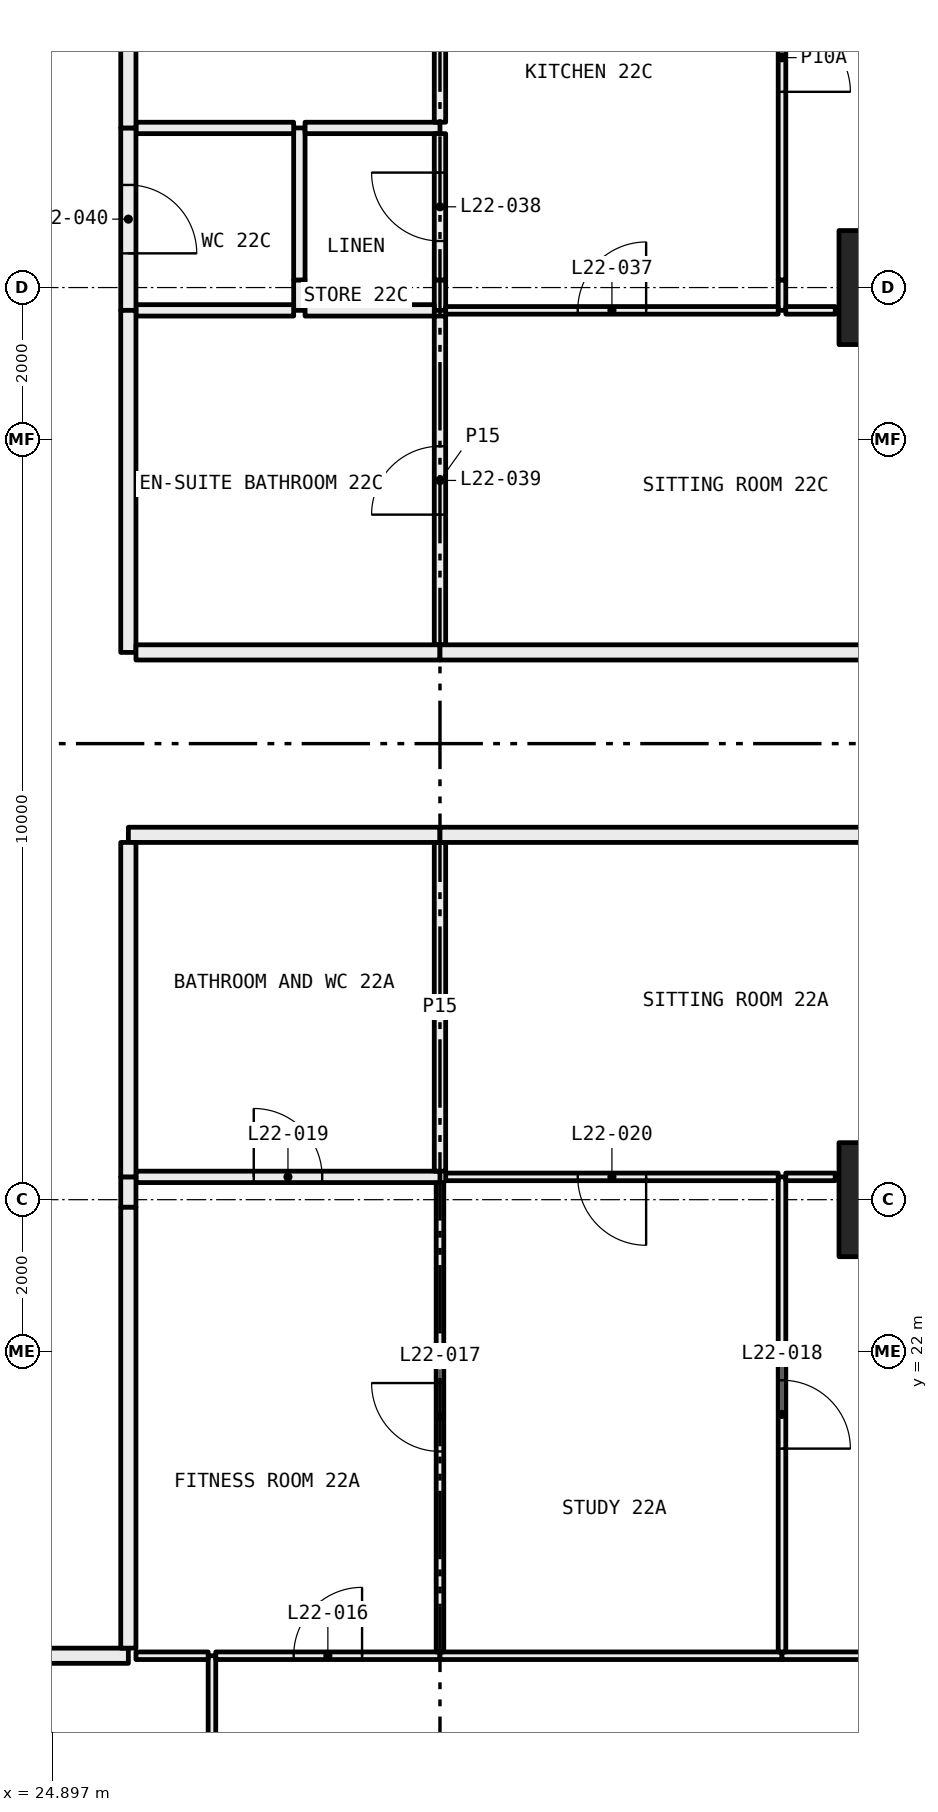
"""IFC4 building model, lengths in metres.
Left out: names, types, materials, properties, quantities, classifications, styles, units other than length and angle.
Written with IfcOpenShell. Run it as: python <this file> out.ifc"""

import sys

from ifc_helpers import new_model, si_unit, direction, frame, frame_2d, origin, origin_2d, place, context, subcontext, project, spatial, rectangle, hollow_rectangle, extrude, element, fill, save


model = new_model("IFC4")
c1 = context("Model", 3, precision=1e-05, world=origin(), true_north=direction((0.0, 1.0)))
c2 = subcontext(c1, "Body", "Model", "MODEL_VIEW")
j1 = project(units=[si_unit("LENGTHUNIT", "METRE"), si_unit("PLANEANGLEUNIT", "RADIAN")], contexts=[c1])
p1 = place(None, origin())
s1 = spatial("IfcSite", under=j1, at=p1, CompositionType="ELEMENT")
p2 = place(p1, origin())
s2 = spatial("IfcBuilding", under=s1, at=p2, CompositionType="ELEMENT")
p3 = place(p2, frame((0.0, 0.0, 88.65)))
s3 = spatial("IfcBuildingStorey", under=s2, at=p3, CompositionType="ELEMENT", Elevation=88.65)
for number, where, z_axis, x_axis in (
    (1, (36.0, 24.0, 0.0), (0.0, 0.0, 1.0), (1.0, 0.0, 0.0)),
    (2, (36.0, 36.0, 0.0), (0.0, 0.0, 1.0), (1.0, 0.0, 0.0)),
):
    element("IfcColumn", number, at=place(p3, frame(where, z_axis=z_axis, x_axis=x_axis)), inside=s3, PredefinedType="COLUMN", context=c2, shape_type="SweptSolid", body=[
        extrude(hollow_rectangle(XDim=1.5, YDim=1.5, WallThickness=0.065, at=origin_2d()), origin(), (0.0, 0.0, 1.0), 3.05),
    ])
p4 = place(p3, frame((27.0, 12.05, 0.0), z_axis=(0.0, 0.0, 1.0), x_axis=(0.0, 1.0, 0.0)))
e3 = element("IfcWall", 3, at=p4, inside=s3, PredefinedType="PARTITIONING", context=c2, shape_type="SweptSolid", body=[
    extrude(rectangle(XDim=5.95, YDim=0.1, at=frame_2d((2.975, 0.0))), origin(), (0.0, 0.0, 1.0), 2.45),
])
p5 = place(p3, frame((26.95, 18.0, 0.0), z_axis=(0.0, 0.0, 1.0), x_axis=(-1.0, 0.0, 0.0)))
e4 = element("IfcWall", 4, at=p5, inside=s3, PredefinedType="PARTITIONING", context=c2, shape_type="SweptSolid", body=[
    extrude(rectangle(XDim=0.95, YDim=0.1, at=frame_2d((0.475, 0.0))), origin(), (0.0, 0.0, 1.0), 3.05),
])
p6 = place(p3, frame((25.9, 18.0, 0.0), z_axis=(0.0, 0.0, 1.0), x_axis=(-1.0, 0.0, 0.0)))
e5 = element("IfcWall", 5, at=p6, inside=s3, PredefinedType="PARTITIONING", context=c2, shape_type="SweptSolid", body=[
    extrude(rectangle(XDim=6.4, YDim=0.2, at=frame_2d((3.2, 0.0))), origin(), (0.0, 0.0, 1.0), 3.05),
])
p7 = place(p3, frame((30.0, 18.0, 0.0), z_axis=(0.0, 0.0, 1.0), x_axis=(-1.0, 0.0, 0.0)))
e6 = element("IfcWall", 6, at=p7, inside=s3, PredefinedType="PARTITIONING", context=c2, shape_type="SweptSolid", body=[
    extrude(rectangle(XDim=2.95, YDim=0.1, at=frame_2d((1.475, 0.0))), origin(), (0.0, 0.0, 1.0), 3.05),
])
p8 = place(p7, frame((1.025, 0.0, 0.0)))
e7 = element("IfcOpeningElement", 7, at=p8, cuts=e6, PredefinedType="OPENING", context=c2, shape_type="SweptSolid", body=[
    extrude(rectangle(XDim=0.9, YDim=2.1, at=frame_2d((0.45, 1.05))), frame((0.0, 0.06, 0.0), z_axis=(0.0, -1.0, 0.0), x_axis=(1.0, 0.0, 0.0)), (0.0, 0.0, 1.0), 0.12),
])
p9 = place(p3, frame((34.5, 18.0, 0.0), z_axis=(0.0, 0.0, 1.0), x_axis=(-1.0, 0.0, 0.0)))
e8 = element("IfcWall", 8, at=p9, inside=s3, PredefinedType="PARTITIONING", context=c2, shape_type="SweptSolid", body=[
    extrude(rectangle(XDim=4.5, YDim=0.1, at=frame_2d((2.25, 0.0))), origin(), (0.0, 0.0, 1.0), 3.05),
])
p10 = place(p3, frame((35.9, 18.0, 0.0), z_axis=(0.0, 0.0, 1.0), x_axis=(-1.0, 0.0, 0.0)))
e9 = element("IfcWall", 9, at=p10, inside=s3, PredefinedType="PARTITIONING", context=c2, shape_type="SweptSolid", body=[
    extrude(rectangle(XDim=1.4, YDim=0.1, at=frame_2d((0.7, 0.0))), origin(), (0.0, 0.0, 1.0), 3.05),
])
p11 = place(p3, frame((30.0, 18.05, 0.0), z_axis=(0.0, 0.0, 1.0), x_axis=(0.0, 1.0, 0.0)))
e10 = element("IfcWall", 10, at=p11, inside=s3, PredefinedType="PARTITIONING", context=c2, shape_type="SweptSolid", body=[
    extrude(rectangle(XDim=6.175, YDim=0.1, at=frame_2d((3.087, 0.0))), origin(), (0.0, 0.0, 1.0), 2.45),
])
p12 = place(p11, frame((2.637, 0.0, 0.0)))
e11 = element("IfcOpeningElement", 11, at=p12, cuts=e10, PredefinedType="OPENING", context=c2, shape_type="SweptSolid", body=[
    extrude(rectangle(XDim=0.9, YDim=2.1, at=frame_2d((0.45, 1.05))), frame((0.0, 0.06, 0.0), z_axis=(0.0, -1.0, 0.0), x_axis=(1.0, 0.0, 0.0)), (0.0, 0.0, 1.0), 0.12),
])
p13 = place(p3, frame((30.0, 24.3, 0.0), z_axis=(0.0, 0.0, 1.0), x_axis=(-1.0, 0.0, 0.0)))
e12 = element("IfcWall", 12, at=p13, inside=s3, PredefinedType="PARTITIONING", context=c2, shape_type="SweptSolid", body=[
    extrude(rectangle(XDim=4.0, YDim=0.15, at=frame_2d((2.0, 0.0))), origin(), (0.0, 0.0, 1.0), 3.05),
])
p14 = place(p13, frame((1.55, 0.0, 0.0)))
e13 = element("IfcOpeningElement", 13, at=p14, cuts=e12, PredefinedType="OPENING", context=c2, shape_type="SweptSolid", body=[
    extrude(rectangle(XDim=0.9, YDim=2.1, at=frame_2d((0.45, 1.05))), frame((0.0, 0.085, 0.0), z_axis=(0.0, -1.0, 0.0), x_axis=(1.0, 0.0, 0.0)), (0.0, 0.0, 1.0), 0.17),
])
p15 = place(p3, frame((25.9, 24.3, 0.0), z_axis=(0.0, 0.0, 1.0), x_axis=(0.0, -1.0, 0.0)))
e14 = element("IfcWall", 14, at=p15, inside=s3, PredefinedType="PARTITIONING", context=c2, shape_type="SweptSolid", body=[
    extrude(rectangle(XDim=0.4, YDim=0.2, at=frame_2d((0.2, 0.0))), origin(), (0.0, 0.0, 1.0), 2.45),
])
p16 = place(p3, frame((25.9, 23.9, 0.0), z_axis=(0.0, 0.0, 1.0), x_axis=(0.0, -1.0, 0.0)))
e15 = element("IfcWall", 15, at=p16, inside=s3, PredefinedType="PARTITIONING", context=c2, shape_type="SweptSolid", body=[
    extrude(rectangle(XDim=5.8, YDim=0.2, at=frame_2d((2.9, 0.0))), origin(), (0.0, 0.0, 1.0), 3.05),
])
p17 = place(p3, frame((34.5, 18.05, 0.0), z_axis=(0.0, 0.0, 1.0), x_axis=(0.0, 1.0, 0.0)))
e16 = element("IfcWall", 16, at=p17, inside=s3, PredefinedType="PARTITIONING", context=c2, shape_type="SweptSolid", body=[
    extrude(rectangle(XDim=6.25, YDim=0.1, at=frame_2d((3.125, 0.0))), origin(), (0.0, 0.0, 1.0), 2.45),
])
p18 = place(p17, frame((2.675, 0.0, 0.0)))
e17 = element("IfcOpeningElement", 17, at=p18, cuts=e16, PredefinedType="OPENING", context=c2, shape_type="SweptSolid", body=[
    extrude(rectangle(XDim=0.9, YDim=2.1, at=frame_2d((0.45, 1.05))), frame((0.0, 0.06, 0.0), z_axis=(0.0, -1.0, 0.0), x_axis=(1.0, 0.0, 0.0)), (0.0, 0.0, 1.0), 0.12),
])
p19 = place(p3, frame((34.45, 24.3, 0.0), z_axis=(0.0, 0.0, 1.0), x_axis=(-1.0, 0.0, 0.0)))
e18 = element("IfcWall", 18, at=p19, inside=s3, PredefinedType="PARTITIONING", context=c2, shape_type="SweptSolid", body=[
    extrude(rectangle(XDim=4.375, YDim=0.1, at=frame_2d((2.188, 0.0))), origin(), (0.0, 0.0, 1.0), 3.05),
])
p20 = place(p19, frame((1.738, 0.0, 0.0)))
e19 = element("IfcOpeningElement", 19, at=p20, cuts=e18, PredefinedType="OPENING", context=c2, shape_type="SweptSolid", body=[
    extrude(rectangle(XDim=0.9, YDim=2.1, at=frame_2d((0.45, 1.05))), frame((0.0, 0.06, 0.0), z_axis=(0.0, -1.0, 0.0), x_axis=(1.0, 0.0, 0.0)), (0.0, 0.0, 1.0), 0.12),
])
p21 = place(p3, frame((35.2, 24.3, 0.0), z_axis=(0.0, 0.0, 1.0), x_axis=(-1.0, 0.0, 0.0)))
e20 = element("IfcWall", 20, at=p21, inside=s3, PredefinedType="PARTITIONING", context=c2, shape_type="SweptSolid", body=[
    extrude(rectangle(XDim=0.65, YDim=0.1, at=frame_2d((0.325, 0.0))), origin(), (0.0, 0.0, 1.0), 3.05),
])
p22 = place(p3, frame((30.0, 24.375, 0.0), z_axis=(0.0, 0.0, 1.0), x_axis=(0.0, 1.0, 0.0)))
e21 = element("IfcWall", 21, at=p22, inside=s3, PredefinedType="PARTITIONING", context=c2, shape_type="SweptSolid", body=[
    extrude(rectangle(XDim=4.325, YDim=0.15, at=frame_2d((2.163, 0.0))), origin(), (0.0, 0.0, 1.0), 3.05),
])
p23 = place(p3, frame((30.0, 28.8, 0.0), z_axis=(0.0, 0.0, 1.0), x_axis=(-1.0, 0.0, 0.0)))
e22 = element("IfcWall", 22, at=p23, inside=s3, PredefinedType="PARTITIONING", context=c2, shape_type="SweptSolid", body=[
    extrude(rectangle(XDim=4.1, YDim=0.2, at=frame_2d((2.05, 0.0))), origin(), (0.0, 0.0, 1.0), 3.05),
])
p24 = place(p3, frame((25.9, 28.7, 0.0), z_axis=(0.0, 0.0, 1.0), x_axis=(0.0, -1.0, 0.0)))
e23 = element("IfcWall", 23, at=p24, inside=s3, PredefinedType="PARTITIONING", context=c2, shape_type="SweptSolid", body=[
    extrude(rectangle(XDim=4.4, YDim=0.2, at=frame_2d((2.2, 0.0))), origin(), (0.0, 0.0, 1.0), 3.05),
])
p25 = place(p3, frame((35.9, 28.8, 0.0), z_axis=(0.0, 0.0, 1.0), x_axis=(-1.0, 0.0, 0.0)))
e24 = element("IfcWall", 24, at=p25, inside=s3, PredefinedType="PARTITIONING", context=c2, shape_type="SweptSolid", body=[
    extrude(rectangle(XDim=5.9, YDim=0.2, at=frame_2d((2.95, 0.0))), origin(), (0.0, 0.0, 1.0), 3.05),
])
p26 = place(p3, frame((28.15, 35.7, 0.0), z_axis=(0.0, 0.0, 1.0), x_axis=(0.0, 1.0, 0.0)))
e25 = element("IfcWall", 25, at=p26, inside=s3, PredefinedType="PARTITIONING", context=c2, shape_type="SweptSolid", body=[
    extrude(rectangle(XDim=0.4, YDim=0.15, at=frame_2d((0.2, 0.0))), origin(), (0.0, 0.0, 1.0), 2.45),
])
p27 = place(p3, frame((28.15, 36.1, 0.0), z_axis=(0.0, 0.0, 1.0), x_axis=(0.0, 1.0, 0.0)))
e26 = element("IfcWall", 26, at=p27, inside=s3, PredefinedType="PARTITIONING", context=c2, shape_type="SweptSolid", body=[
    extrude(rectangle(XDim=2.0, YDim=0.15, at=frame_2d((1.0, 0.0))), origin(), (0.0, 0.0, 1.0), 3.05),
])
for number, where, z_axis, x_axis in (
    (27, (28.075, 38.1, 0.0), (0.0, 0.0, 1.0), (-1.0, 0.0, 0.0)),
    (28, (26.0, 35.7, 0.0), (0.0, 0.0, 1.0), (1.0, 0.0, 0.0)),
):
    element("IfcWall", number, at=place(p3, frame(where, z_axis=z_axis, x_axis=x_axis)), inside=s3, PredefinedType="PARTITIONING", context=c2, shape_type="SweptSolid", body=[
        extrude(rectangle(XDim=2.075, YDim=0.15, at=frame_2d((1.038, 0.0))), origin(), (0.0, 0.0, 1.0), 3.05),
    ])
p28 = place(p3, frame((25.9, 38.1, 0.0), z_axis=(0.0, 0.0, 1.0), x_axis=(0.0, -1.0, 0.0)))
e29 = element("IfcWall", 29, at=p28, inside=s3, PredefinedType="PARTITIONING", context=c2, shape_type="SweptSolid", body=[
    extrude(rectangle(XDim=2.4, YDim=0.2, at=frame_2d((1.2, 0.0))), origin(), (0.0, 0.0, 1.0), 2.45),
])
p29 = place(p28, frame((0.75, 0.0, 0.0)))
e30 = element("IfcOpeningElement", 30, at=p29, cuts=e29, PredefinedType="OPENING", context=c2, shape_type="SweptSolid", body=[
    extrude(rectangle(XDim=0.9, YDim=2.1, at=frame_2d((0.45, 1.05))), frame((0.0, 0.11, 0.0), z_axis=(0.0, -1.0, 0.0), x_axis=(1.0, 0.0, 0.0)), (0.0, 0.0, 1.0), 0.22),
])
p30 = place(p3, frame((30.0, 38.1, 0.0), z_axis=(0.0, 0.0, 1.0), x_axis=(-1.0, 0.0, 0.0)))
e31 = element("IfcWall", 31, at=p30, inside=s3, PredefinedType="PARTITIONING", context=c2, shape_type="SweptSolid", body=[
    extrude(rectangle(XDim=1.775, YDim=0.15, at=frame_2d((0.887, 0.0))), origin(), (0.0, 0.0, 1.0), 3.05),
])
p31 = place(p3, frame((30.0, 35.7, 0.0), z_axis=(0.0, 0.0, 1.0), x_axis=(0.0, 1.0, 0.0)))
e32 = element("IfcWall", 32, at=p31, inside=s3, PredefinedType="PARTITIONING", context=c2, shape_type="SweptSolid", body=[
    extrude(rectangle(XDim=0.4, YDim=0.15, at=frame_2d((0.2, 0.0))), origin(), (0.0, 0.0, 1.0), 2.45),
])
p32 = place(p3, frame((30.0, 36.1, 0.0), z_axis=(0.0, 0.0, 1.0), x_axis=(0.0, 1.0, 0.0)))
e33 = element("IfcWall", 33, at=p32, inside=s3, PredefinedType="PARTITIONING", context=c2, shape_type="SweptSolid", body=[
    extrude(rectangle(XDim=1.925, YDim=0.15, at=frame_2d((0.962, 0.0))), origin(), (0.0, 0.0, 1.0), 3.05),
])
p33 = place(p32, frame((0.512, 0.0, 0.0)))
e34 = element("IfcOpeningElement", 34, at=p33, cuts=e33, PredefinedType="OPENING", context=c2, shape_type="SweptSolid", body=[
    extrude(rectangle(XDim=0.9, YDim=2.1, at=frame_2d((0.45, 1.05))), frame((0.0, 0.085, 0.0), z_axis=(0.0, -1.0, 0.0), x_axis=(1.0, 0.0, 0.0)), (0.0, 0.0, 1.0), 0.17),
])
p34 = place(p3, frame((28.225, 35.7, 0.0), z_axis=(0.0, 0.0, 1.0), x_axis=(1.0, 0.0, 0.0)))
e35 = element("IfcWall", 35, at=p34, inside=s3, PredefinedType="PARTITIONING", context=c2, shape_type="SweptSolid", body=[
    extrude(rectangle(XDim=1.7, YDim=0.15, at=frame_2d((0.85, 0.0))), origin(), (0.0, 0.0, 1.0), 3.05),
])
p35 = place(p3, frame((30.0, 38.175, 0.0), z_axis=(0.0, 0.0, 1.0), x_axis=(0.0, 1.0, 0.0)))
e36 = element("IfcWall", 36, at=p35, inside=s3, PredefinedType="PARTITIONING", context=c2, shape_type="SweptSolid", body=[
    extrude(rectangle(XDim=3.75, YDim=0.15, at=frame_2d((1.875, 0.0))), origin(), (0.0, 0.0, 1.0), 3.05),
])
p36 = place(p3, frame((25.9, 41.9, 0.0), z_axis=(0.0, 0.0, 1.0), x_axis=(0.0, -1.0, 0.0)))
e37 = element("IfcWall", 37, at=p36, inside=s3, PredefinedType="PARTITIONING", context=c2, shape_type="SweptSolid", body=[
    extrude(rectangle(XDim=3.8, YDim=0.2, at=frame_2d((1.9, 0.0))), origin(), (0.0, 0.0, 1.0), 3.05),
])
p37 = place(p3, frame((34.5, 35.7, 0.0), z_axis=(0.0, 0.0, 1.0), x_axis=(0.0, 1.0, 0.0)))
e38 = element("IfcWall", 38, at=p37, inside=s3, PredefinedType="PARTITIONING", context=c2, shape_type="SweptSolid", body=[
    extrude(rectangle(XDim=0.4, YDim=0.1, at=frame_2d((0.2, 0.0))), origin(), (0.0, 0.0, 1.0), 2.45),
])
p38 = place(p3, frame((34.5, 36.1, 0.0), z_axis=(0.0, 0.0, 1.0), x_axis=(0.0, 1.0, 0.0)))
e39 = element("IfcWall", 39, at=p38, inside=s3, PredefinedType="PARTITIONING", context=c2, shape_type="SweptSolid", body=[
    extrude(rectangle(XDim=5.85, YDim=0.1, at=frame_2d((2.925, 0.0))), origin(), (0.0, 0.0, 1.0), 3.05),
])
p39 = place(p38, frame((2.475, 0.0, 0.0)))
e40 = element("IfcOpeningElement", 40, at=p39, cuts=e39, PredefinedType="OPENING", context=c2, shape_type="SweptSolid", body=[
    extrude(rectangle(XDim=0.9, YDim=2.1, at=frame_2d((0.45, 1.05))), frame((0.0, 0.06, 0.0), z_axis=(0.0, -1.0, 0.0), x_axis=(1.0, 0.0, 0.0)), (0.0, 0.0, 1.0), 0.12),
])
p40 = place(p3, frame((30.075, 35.7, 0.0), z_axis=(0.0, 0.0, 1.0), x_axis=(1.0, 0.0, 0.0)))
e41 = element("IfcWall", 41, at=p40, inside=s3, PredefinedType="PARTITIONING", context=c2, shape_type="SweptSolid", body=[
    extrude(rectangle(XDim=4.375, YDim=0.1, at=frame_2d((2.188, 0.0))), origin(), (0.0, 0.0, 1.0), 3.05),
])
p41 = place(p40, frame((1.738, 0.0, 0.0)))
e42 = element("IfcOpeningElement", 42, at=p41, cuts=e41, PredefinedType="OPENING", context=c2, shape_type="SweptSolid", body=[
    extrude(rectangle(XDim=0.9, YDim=2.1, at=frame_2d((0.45, 1.05))), frame((0.0, 0.06, 0.0), z_axis=(0.0, -1.0, 0.0), x_axis=(1.0, 0.0, 0.0)), (0.0, 0.0, 1.0), 0.12),
])
p42 = place(p3, frame((34.55, 35.7, 0.0), z_axis=(0.0, 0.0, 1.0), x_axis=(1.0, 0.0, 0.0)))
e43 = element("IfcWall", 43, at=p42, inside=s3, PredefinedType="PARTITIONING", context=c2, shape_type="SweptSolid", body=[
    extrude(rectangle(XDim=0.65, YDim=0.1, at=frame_2d((0.325, 0.0))), origin(), (0.0, 0.0, 1.0), 3.05),
])
p43 = place(p3, frame((30.0, 31.3, 0.0), z_axis=(0.0, 0.0, 1.0), x_axis=(0.0, 1.0, 0.0)))
e44 = element("IfcWall", 44, at=p43, inside=s3, PredefinedType="PARTITIONING", context=c2, shape_type="SweptSolid", body=[
    extrude(rectangle(XDim=4.325, YDim=0.15, at=frame_2d((2.163, 0.0))), origin(), (0.0, 0.0, 1.0), 3.05),
])
p44 = place(p43, frame((1.712, 0.0, 0.0)))
e45 = element("IfcOpeningElement", 45, at=p44, cuts=e44, PredefinedType="OPENING", context=c2, shape_type="SweptSolid", body=[
    extrude(rectangle(XDim=0.9, YDim=2.1, at=frame_2d((0.45, 1.05))), frame((0.0, 0.085, 0.0), z_axis=(0.0, -1.0, 0.0), x_axis=(1.0, 0.0, 0.0)), (0.0, 0.0, 1.0), 0.17),
])
p45 = place(p3, frame((25.9, 35.7, 0.0), z_axis=(0.0, 0.0, 1.0), x_axis=(0.0, -1.0, 0.0)))
e46 = element("IfcWall", 46, at=p45, inside=s3, PredefinedType="PARTITIONING", context=c2, shape_type="SweptSolid", body=[
    extrude(rectangle(XDim=4.5, YDim=0.2, at=frame_2d((2.25, 0.0))), origin(), (0.0, 0.0, 1.0), 3.05),
])
p46 = place(p3, frame((26.0, 31.2, 0.0), z_axis=(0.0, 0.0, 1.0), x_axis=(1.0, 0.0, 0.0)))
e47 = element("IfcWall", 47, at=p46, inside=s3, PredefinedType="PARTITIONING", context=c2, shape_type="SweptSolid", body=[
    extrude(rectangle(XDim=4.0, YDim=0.2, at=frame_2d((2.0, 0.0))), origin(), (0.0, 0.0, 1.0), 3.05),
])
p47 = place(p3, frame((30.0, 31.2, 0.0), z_axis=(0.0, 0.0, 1.0), x_axis=(1.0, 0.0, 0.0)))
e48 = element("IfcWall", 48, at=p47, inside=s3, PredefinedType="PARTITIONING", context=c2, shape_type="SweptSolid", body=[
    extrude(rectangle(XDim=6.1, YDim=0.2, at=frame_2d((3.05, 0.0))), origin(), (0.0, 0.0, 1.0), 2.45),
])
p48 = place(p8, frame((0.9, 0.0, 0.0), x_axis=(-1.0, 0.0, 0.0)))
e49 = element("IfcDoor", 49, at=p48, inside=s3, OperationType="SINGLE_SWING_LEFT", PredefinedType="DOOR", context=c2, shape_type="SweptSolid", body=[
    extrude(rectangle(XDim=0.9, YDim=2.1, at=frame_2d((0.45, 1.05))), frame((0.0, 0.025, 0.0), z_axis=(0.0, -1.0, 0.0), x_axis=(1.0, 0.0, 0.0)), (0.0, 0.0, 1.0), 0.05),
])
fill(e7, e49)
p49 = place(p12, origin())
e50 = element("IfcDoor", 50, at=p49, inside=s3, OperationType="SINGLE_SWING_LEFT", PredefinedType="DOOR", context=c2, shape_type="SweptSolid", body=[
    extrude(rectangle(XDim=0.9, YDim=2.1, at=frame_2d((0.45, 1.05))), frame((0.0, 0.025, 0.0), z_axis=(0.0, -1.0, 0.0), x_axis=(1.0, 0.0, 0.0)), (0.0, 0.0, 1.0), 0.05),
])
fill(e11, e50)
p50 = place(p18, frame((0.9, 0.0, 0.0), x_axis=(-1.0, 0.0, 0.0)))
e51 = element("IfcDoor", 51, at=p50, inside=s3, OperationType="SINGLE_SWING_LEFT", PredefinedType="DOOR", context=c2, shape_type="SweptSolid", body=[
    extrude(rectangle(XDim=0.9, YDim=2.1, at=frame_2d((0.45, 1.05))), frame((0.0, 0.025, 0.0), z_axis=(0.0, -1.0, 0.0), x_axis=(1.0, 0.0, 0.0)), (0.0, 0.0, 1.0), 0.05),
])
fill(e17, e51)
p51 = place(p14, frame((0.9, 0.0, 0.0), x_axis=(-1.0, 0.0, 0.0)))
e52 = element("IfcDoor", 52, at=p51, inside=s3, OperationType="SINGLE_SWING_RIGHT", PredefinedType="DOOR", context=c2, shape_type="SweptSolid", body=[
    extrude(rectangle(XDim=0.9, YDim=2.1, at=frame_2d((0.45, 1.05))), frame((0.0, 0.025, 0.0), z_axis=(0.0, -1.0, 0.0), x_axis=(1.0, 0.0, 0.0)), (0.0, 0.0, 1.0), 0.05),
])
fill(e13, e52)
p52 = place(p20, origin())
e53 = element("IfcDoor", 53, at=p52, inside=s3, OperationType="SINGLE_SWING_RIGHT", PredefinedType="DOOR", context=c2, shape_type="SweptSolid", body=[
    extrude(rectangle(XDim=0.9, YDim=2.1, at=frame_2d((0.45, 1.05))), frame((0.0, 0.025, 0.0), z_axis=(0.0, -1.0, 0.0), x_axis=(1.0, 0.0, 0.0)), (0.0, 0.0, 1.0), 0.05),
])
fill(e19, e53)
p53 = place(p39, frame((0.9, 0.0, 0.0), x_axis=(-1.0, 0.0, 0.0)))
e54 = element("IfcDoor", 54, at=p53, inside=s3, OperationType="SINGLE_SWING_LEFT", PredefinedType="DOOR", context=c2, shape_type="SweptSolid", body=[
    extrude(rectangle(XDim=0.9, YDim=2.1, at=frame_2d((0.45, 1.05))), frame((0.0, 0.025, 0.0), z_axis=(0.0, -1.0, 0.0), x_axis=(1.0, 0.0, 0.0)), (0.0, 0.0, 1.0), 0.05),
])
fill(e40, e54)
p54 = place(p41, origin())
e55 = element("IfcDoor", 55, at=p54, inside=s3, OperationType="SINGLE_SWING_LEFT", PredefinedType="DOOR", context=c2, shape_type="SweptSolid", body=[
    extrude(rectangle(XDim=0.9, YDim=2.1, at=frame_2d((0.45, 1.05))), frame((0.0, 0.025, 0.0), z_axis=(0.0, -1.0, 0.0), x_axis=(1.0, 0.0, 0.0)), (0.0, 0.0, 1.0), 0.05),
])
fill(e42, e55)
p55 = place(p33, origin())
e56 = element("IfcDoor", 56, at=p55, inside=s3, OperationType="SINGLE_SWING_LEFT", PredefinedType="DOOR", context=c2, shape_type="SweptSolid", body=[
    extrude(rectangle(XDim=0.9, YDim=2.1, at=frame_2d((0.45, 1.05))), frame((0.0, 0.025, 0.0), z_axis=(0.0, -1.0, 0.0), x_axis=(1.0, 0.0, 0.0)), (0.0, 0.0, 1.0), 0.05),
])
fill(e34, e56)
p56 = place(p44, origin())
e57 = element("IfcDoor", 57, at=p56, inside=s3, OperationType="SINGLE_SWING_RIGHT", PredefinedType="DOOR", context=c2, shape_type="SweptSolid", body=[
    extrude(rectangle(XDim=0.9, YDim=2.1, at=frame_2d((0.45, 1.05))), frame((0.0, 0.025, 0.0), z_axis=(0.0, -1.0, 0.0), x_axis=(1.0, 0.0, 0.0)), (0.0, 0.0, 1.0), 0.05),
])
fill(e45, e57)
p57 = place(p29, origin())
e58 = element("IfcDoor", 58, at=p57, inside=s3, OperationType="SINGLE_SWING_LEFT", PredefinedType="DOOR", context=c2, shape_type="SweptSolid", body=[
    extrude(rectangle(XDim=0.9, YDim=2.1, at=frame_2d((0.45, 1.05))), frame((0.0, 0.025, 0.0), z_axis=(0.0, -1.0, 0.0), x_axis=(1.0, 0.0, 0.0)), (0.0, 0.0, 1.0), 0.05),
])
fill(e30, e58)
save(model, sys.argv[1])
